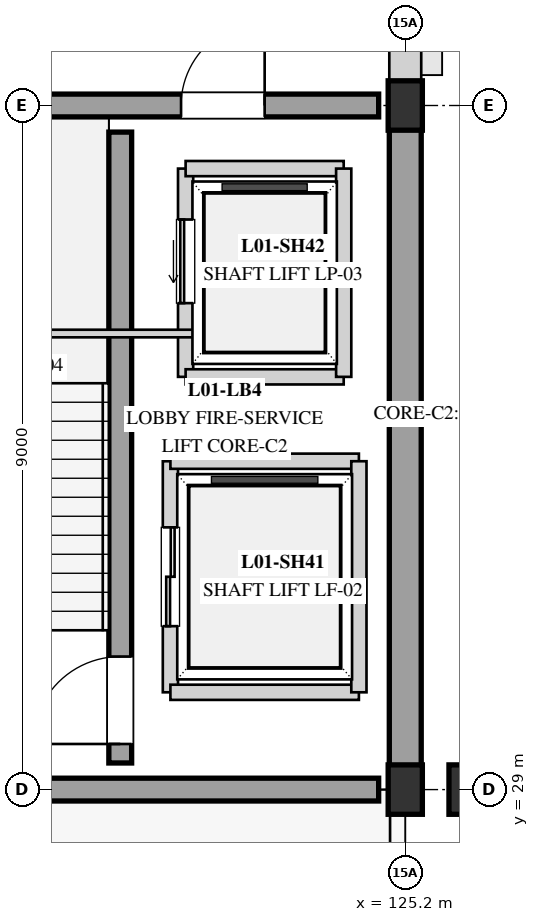
"""IFC4 building model, lengths in metres.
Left out: names, types, materials, properties, quantities, classifications, styles, units other than length and angle.
Written with IfcOpenShell. Run it as: python <this file> out.ifc"""

import sys

from ifc_helpers import new_model, si_unit, direction, frame, frame_2d, origin, origin_2d, place, context, subcontext, project, spatial, rectangle, extrude, element, fill, save


model = new_model("IFC4")
c1 = context("Model", 3, precision=1e-05, world=origin(), true_north=direction((0.0, 1.0)))
c2 = subcontext(c1, "Body", "Model", "MODEL_VIEW")
j1 = project(units=[si_unit("LENGTHUNIT", "METRE"), si_unit("PLANEANGLEUNIT", "RADIAN")], contexts=[c1])
p1 = place(None, origin())
s1 = spatial("IfcSite", under=j1, at=p1, CompositionType="ELEMENT")
p2 = place(p1, origin())
s2 = spatial("IfcBuilding", under=s1, at=p2, CompositionType="ELEMENT")
p3 = place(p2, frame((0.0, 0.0, 4.5)))
s3 = spatial("IfcBuildingStorey", under=s2, at=p3, CompositionType="ELEMENT", Elevation=4.5)
for number, where, z_axis, x_axis in (
    (1, (125.2, 29.0, 0.0), (0.0, 0.0, 1.0), (1.0, 0.0, 0.0)),
    (2, (125.2, 38.0, 0.0), (0.0, 0.0, 1.0), (1.0, 0.0, 0.0)),
):
    element("IfcColumn", number, at=place(p3, frame(where, z_axis=z_axis, x_axis=x_axis)), inside=s3, PredefinedType="COLUMN", context=c2, shape_type="SweptSolid", body=[
        extrude(rectangle(XDim=0.45, YDim=0.65, at=origin_2d()), origin(), (0.0, 0.0, 1.0), 3.9),
    ])
p4 = place(p3, frame((126.0, 29.0, 0.0), z_axis=(0.0, 0.0, 1.0), x_axis=(1.0, 0.0, 0.0)))
e3 = element("IfcColumn", 3, at=p4, inside=s3, PredefinedType="COLUMN", context=c2, shape_type="SweptSolid", body=[
    extrude(rectangle(XDim=0.45, YDim=0.65, at=origin_2d()), origin(), (0.0, 0.0, 1.0), 5.59),
])
p5 = place(p3, frame((125.2, 29.0, 0.0), z_axis=(0.0, 0.0, 1.0), x_axis=(0.0, 1.0, 0.0)))
e4 = element("IfcWall", 4, at=p5, inside=s3, PredefinedType="STANDARD", context=c2, shape_type="SweptSolid", body=[
    extrude(rectangle(XDim=9.0, YDim=0.42, at=frame_2d((4.5, 0.0))), origin(), (0.0, 0.0, 1.0), 3.66),
])
p6 = place(p3, frame((125.2, 38.0, 0.0), z_axis=(0.0, 0.0, 1.0), x_axis=(0.0, 1.0, 0.0)))
e5 = element("IfcWall", 5, at=p6, inside=s3, PredefinedType="STANDARD", context=c2, shape_type="SweptSolid", body=[
    extrude(rectangle(XDim=9.0, YDim=0.42, at=frame_2d((4.5, 0.0))), origin(), (0.0, 0.0, 1.0), 2.79),
])
p7 = place(p6, frame((1.8, 0.0, 0.35)))
e6 = element("IfcOpeningElement", 6, at=p7, cuts=e5, PredefinedType="OPENING", context=c2, shape_type="SweptSolid", body=[
    extrude(rectangle(XDim=1.8, YDim=2.26, at=frame_2d((0.9, 1.13))), frame((0.0, 0.22, 0.0), z_axis=(0.0, -1.0, 0.0), x_axis=(1.0, 0.0, 0.0)), (0.0, 0.0, 1.0), 0.44),
])
p8 = place(p6, frame((5.4, 0.0, 0.35)))
e7 = element("IfcOpeningElement", 7, at=p8, cuts=e5, PredefinedType="OPENING", context=c2, shape_type="SweptSolid", body=[
    extrude(rectangle(XDim=1.8, YDim=2.26, at=frame_2d((0.9, 1.13))), frame((0.0, 0.22, 0.0), z_axis=(0.0, -1.0, 0.0), x_axis=(1.0, 0.0, 0.0)), (0.0, 0.0, 1.0), 0.44),
])
p9 = place(p3, frame((121.45, 29.35, 0.0), z_axis=(0.0, 0.0, 1.0), x_axis=(0.0, 1.0, 0.0)))
e8 = element("IfcWall", 8, at=p9, inside=s3, PredefinedType="SHEAR", context=c2, shape_type="SweptSolid", body=[
    extrude(rectangle(XDim=8.3, YDim=0.3, at=frame_2d((4.15, 0.0))), origin(), (0.0, 0.0, 1.0), 3.62),
])
p10 = place(p9, frame((0.25, 0.0, 0.0)))
e9 = element("IfcOpeningElement", 9, at=p10, cuts=e8, PredefinedType="OPENING", context=c2, shape_type="SweptSolid", body=[
    extrude(rectangle(XDim=1.15, YDim=2.15, at=frame_2d((0.575, 1.075))), frame((0.0, 0.16, 0.0), z_axis=(0.0, -1.0, 0.0), x_axis=(1.0, 0.0, 0.0)), (0.0, 0.0, 1.0), 0.32),
])
p11 = place(p3, frame((117.35, 29.0, 0.0), z_axis=(0.0, 0.0, 1.0), x_axis=(1.0, 0.0, 0.0)))
e10 = element("IfcWall", 10, at=p11, inside=s3, PredefinedType="SHEAR", context=c2, shape_type="SweptSolid", body=[
    extrude(rectangle(XDim=7.5, YDim=0.3, at=frame_2d((3.75, 0.0))), origin(), (0.0, 0.0, 1.0), 3.62),
])
p12 = place(p3, frame((117.35, 38.0, 0.0), z_axis=(0.0, 0.0, 1.0), x_axis=(1.0, 0.0, 0.0)))
e11 = element("IfcWall", 11, at=p12, inside=s3, PredefinedType="SHEAR", context=c2, shape_type="SweptSolid", body=[
    extrude(rectangle(XDim=7.5, YDim=0.3, at=frame_2d((3.75, 0.0))), origin(), (0.0, 0.0, 1.0), 3.62),
])
p13 = place(p12, frame((4.9, 0.0, 0.0)))
e12 = element("IfcOpeningElement", 12, at=p13, cuts=e11, PredefinedType="OPENING", context=c2, shape_type="SweptSolid", body=[
    extrude(rectangle(XDim=1.1, YDim=2.1, at=frame_2d((0.55, 1.05))), frame((0.0, 0.16, 0.0), z_axis=(0.0, -1.0, 0.0), x_axis=(1.0, 0.0, 0.0)), (0.0, 0.0, 1.0), 0.32),
])
p14 = place(p3, frame((122.11, 30.28, 0.0), z_axis=(0.0, 0.0, 1.0), x_axis=(0.0, 1.0, 0.0)))
e13 = element("IfcWall", 13, at=p14, inside=s3, PredefinedType="SOLIDWALL", context=c2, shape_type="SweptSolid", body=[
    extrude(rectangle(XDim=3.04, YDim=0.2, at=frame_2d((1.52, 0.0))), origin(), (0.0, 0.0, 1.0), 2.65),
])
p15 = place(p14, frame((0.87, 0.0, 0.0)))
e14 = element("IfcOpeningElement", 14, at=p15, cuts=e13, PredefinedType="OPENING", context=c2, shape_type="SweptSolid", body=[
    extrude(rectangle(XDim=1.3, YDim=2.2, at=frame_2d((0.65, 1.1))), frame((0.0, 0.11, 0.0), z_axis=(0.0, -1.0, 0.0), x_axis=(1.0, 0.0, 0.0)), (0.0, 0.0, 1.0), 0.22),
])
for number, where, z_axis, x_axis in (
    (15, (122.11, 30.28, 0.0), (0.0, 0.0, 1.0), (1.0, 0.0, 0.0)),
    (16, (122.11, 33.32, 0.0), (0.0, 0.0, 1.0), (1.0, 0.0, 0.0)),
):
    element("IfcWall", number, at=place(p3, frame(where, z_axis=z_axis, x_axis=x_axis)), inside=s3, PredefinedType="SOLIDWALL", context=c2, shape_type="SweptSolid", body=[
        extrude(rectangle(XDim=2.48, YDim=0.2, at=frame_2d((1.24, 0.0))), origin(), (0.0, 0.0, 1.0), 2.65),
    ])
p16 = place(p3, frame((124.59, 30.28, 0.0), z_axis=(0.0, 0.0, 1.0), x_axis=(0.0, 1.0, 0.0)))
e17 = element("IfcWall", 17, at=p16, inside=s3, PredefinedType="SOLIDWALL", context=c2, shape_type="SweptSolid", body=[
    extrude(rectangle(XDim=3.04, YDim=0.2, at=frame_2d((1.52, 0.0))), origin(), (0.0, 0.0, 1.0), 2.65),
])
p17 = place(p3, frame((122.31, 34.43, 0.0), z_axis=(0.0, 0.0, 1.0), x_axis=(0.0, 1.0, 0.0)))
e18 = element("IfcWall", 18, at=p17, inside=s3, PredefinedType="SOLIDWALL", context=c2, shape_type="SweptSolid", body=[
    extrude(rectangle(XDim=2.74, YDim=0.2, at=frame_2d((1.37, 0.0))), origin(), (0.0, 0.0, 1.0), 2.65),
])
p18 = place(p17, frame((0.97, 0.0, 0.0)))
e19 = element("IfcOpeningElement", 19, at=p18, cuts=e18, PredefinedType="OPENING", context=c2, shape_type="SweptSolid", body=[
    extrude(rectangle(XDim=1.1, YDim=2.1, at=frame_2d((0.55, 1.05))), frame((0.0, 0.11, 0.0), z_axis=(0.0, -1.0, 0.0), x_axis=(1.0, 0.0, 0.0)), (0.0, 0.0, 1.0), 0.22),
])
for number, where, z_axis, x_axis in (
    (20, (122.31, 34.43, 0.0), (0.0, 0.0, 1.0), (1.0, 0.0, 0.0)),
    (21, (122.31, 37.17, 0.0), (0.0, 0.0, 1.0), (1.0, 0.0, 0.0)),
):
    element("IfcWall", number, at=place(p3, frame(where, z_axis=z_axis, x_axis=x_axis)), inside=s3, PredefinedType="SOLIDWALL", context=c2, shape_type="SweptSolid", body=[
        extrude(rectangle(XDim=2.08, YDim=0.2, at=frame_2d((1.04, 0.0))), origin(), (0.0, 0.0, 1.0), 2.65),
    ])
p19 = place(p3, frame((124.39, 34.43, 0.0), z_axis=(0.0, 0.0, 1.0), x_axis=(0.0, 1.0, 0.0)))
e22 = element("IfcWall", 22, at=p19, inside=s3, PredefinedType="SOLIDWALL", context=c2, shape_type="SweptSolid", body=[
    extrude(rectangle(XDim=2.74, YDim=0.2, at=frame_2d((1.37, 0.0))), origin(), (0.0, 0.0, 1.0), 2.65),
])
p20 = place(p3, frame((118.5, 35.0, 0.0), z_axis=(0.0, 0.0, 1.0), x_axis=(1.0, 0.0, 0.0)))
e23 = element("IfcWall", 23, at=p20, inside=s3, PredefinedType="PARTITIONING", context=c2, shape_type="SweptSolid", body=[
    extrude(rectangle(XDim=5.5, YDim=0.1, at=frame_2d((2.75, 0.0))), origin(), (0.0, 0.0, 1.0), 2.1),
])
p21 = place(p10, origin())
e24 = element("IfcDoor", 24, at=p21, inside=s3, OperationType="SINGLE_SWING_LEFT", PredefinedType="DOOR", context=c2, shape_type="SweptSolid", body=[
    extrude(rectangle(XDim=1.15, YDim=2.15, at=frame_2d((0.575, 1.075))), frame((0.0, 0.025, 0.0), z_axis=(0.0, -1.0, 0.0), x_axis=(1.0, 0.0, 0.0)), (0.0, 0.0, 1.0), 0.05),
])
fill(e9, e24)
p22 = place(p13, origin())
e25 = element("IfcDoor", 25, at=p22, inside=s3, OperationType="SINGLE_SWING_RIGHT", PredefinedType="DOOR", context=c2, shape_type="SweptSolid", body=[
    extrude(rectangle(XDim=1.1, YDim=2.1, at=frame_2d((0.55, 1.05))), frame((0.0, 0.025, 0.0), z_axis=(0.0, -1.0, 0.0), x_axis=(1.0, 0.0, 0.0)), (0.0, 0.0, 1.0), 0.05),
])
fill(e12, e25)
p23 = place(p15, origin())
e26 = element("IfcDoor", 26, at=p23, inside=s3, OperationType="DOUBLE_DOOR_SLIDING", PredefinedType="DOOR", context=c2, shape_type="SweptSolid", body=[
    extrude(rectangle(XDim=1.3, YDim=2.2, at=frame_2d((0.65, 1.1))), frame((0.0, 0.025, 0.0), z_axis=(0.0, -1.0, 0.0), x_axis=(1.0, 0.0, 0.0)), (0.0, 0.0, 1.0), 0.05),
])
fill(e14, e26)
p24 = place(p18, origin())
e27 = element("IfcDoor", 27, at=p24, inside=s3, OperationType="SLIDING_TO_LEFT", PredefinedType="DOOR", context=c2, shape_type="SweptSolid", body=[
    extrude(rectangle(XDim=1.1, YDim=2.1, at=frame_2d((0.55, 1.05))), frame((0.0, 0.025, 0.0), z_axis=(0.0, -1.0, 0.0), x_axis=(1.0, 0.0, 0.0)), (0.0, 0.0, 1.0), 0.05),
])
fill(e19, e27)
save(model, sys.argv[1])
